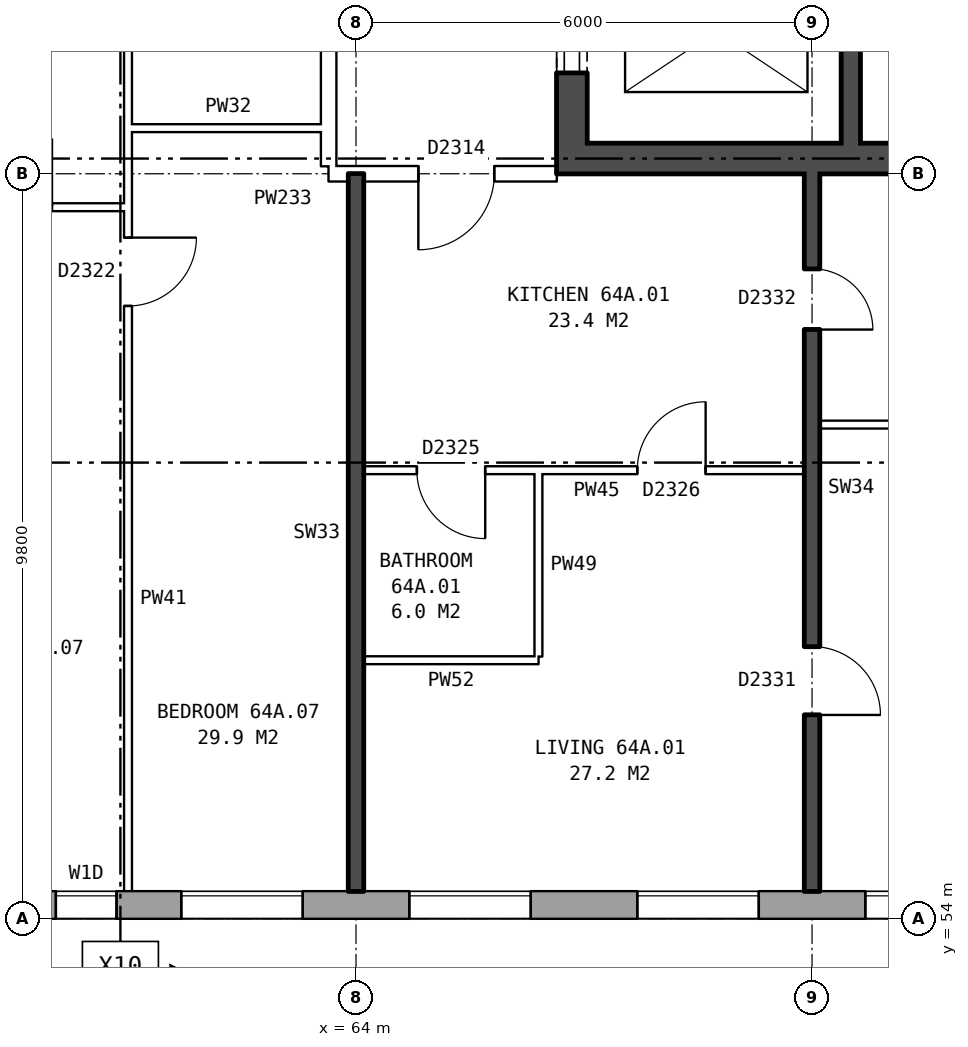
"""IFC4 building model, lengths in metres.
Left out: names, types, materials, properties, quantities, classifications, styles, units other than length and angle.
Written with IfcOpenShell. Run it as: python <this file> out.ifc"""

import sys

from ifc_helpers import new_model, si_unit, direction, frame, frame_2d, origin, place, context, subcontext, project, spatial, rectangle, extrude, element, fill, save


model = new_model("IFC4")
c1 = context("Model", 3, precision=1e-05, world=origin(), true_north=direction((0.0, 1.0)))
c2 = subcontext(c1, "Body", "Model", "MODEL_VIEW")
j1 = project(units=[si_unit("LENGTHUNIT", "METRE"), si_unit("PLANEANGLEUNIT", "RADIAN")], contexts=[c1])
p1 = place(None, origin())
s1 = spatial("IfcSite", under=j1, at=p1, CompositionType="ELEMENT")
p2 = place(p1, origin())
s2 = spatial("IfcBuilding", under=s1, at=p2, CompositionType="ELEMENT")
p3 = place(p2, frame((0.0, 0.0, 227.6)))
s3 = spatial("IfcBuildingStorey", under=s2, at=p3, CompositionType="ELEMENT", Elevation=227.6)
p4 = place(p3, frame((35.075, 54.18, 0.0), z_axis=(0.0, 0.0, 1.0), x_axis=(1.0, 0.0, 0.0)))
e1 = element("IfcWall", 1, at=p4, inside=s3, PredefinedType="STANDARD", context=c2, shape_type="SweptSolid", body=[
    extrude(rectangle(XDim=39.875, YDim=0.36, at=frame_2d((19.938, 0.0))), origin(), (0.0, 0.0, 1.0), 2.85),
])
p5 = place(p4, frame((2.625, 0.0, 0.8)))
e2 = element("IfcOpeningElement", 2, at=p5, cuts=e1, PredefinedType="OPENING", context=c2, shape_type="SweptSolid", body=[
    extrude(rectangle(XDim=1.6, YDim=1.8, at=frame_2d((0.8, 0.9))), frame((0.0, 0.19, 0.0), z_axis=(0.0, -1.0, 0.0), x_axis=(1.0, 0.0, 0.0)), (0.0, 0.0, 1.0), 0.38),
])
p6 = place(p4, frame((5.625, 0.0, 0.8)))
e3 = element("IfcOpeningElement", 3, at=p6, cuts=e1, PredefinedType="OPENING", context=c2, shape_type="SweptSolid", body=[
    extrude(rectangle(XDim=1.6, YDim=1.8, at=frame_2d((0.8, 0.9))), frame((0.0, 0.19, 0.0), z_axis=(0.0, -1.0, 0.0), x_axis=(1.0, 0.0, 0.0)), (0.0, 0.0, 1.0), 0.38),
])
p7 = place(p4, frame((8.625, 0.0, 0.8)))
e4 = element("IfcOpeningElement", 4, at=p7, cuts=e1, PredefinedType="OPENING", context=c2, shape_type="SweptSolid", body=[
    extrude(rectangle(XDim=1.6, YDim=1.8, at=frame_2d((0.8, 0.9))), frame((0.0, 0.19, 0.0), z_axis=(0.0, -1.0, 0.0), x_axis=(1.0, 0.0, 0.0)), (0.0, 0.0, 1.0), 0.38),
])
p8 = place(p4, frame((11.625, 0.0, 0.8)))
e5 = element("IfcOpeningElement", 5, at=p8, cuts=e1, PredefinedType="OPENING", context=c2, shape_type="SweptSolid", body=[
    extrude(rectangle(XDim=1.6, YDim=1.8, at=frame_2d((0.8, 0.9))), frame((0.0, 0.19, 0.0), z_axis=(0.0, -1.0, 0.0), x_axis=(1.0, 0.0, 0.0)), (0.0, 0.0, 1.0), 0.38),
])
p9 = place(p4, frame((14.625, 0.0, 0.35)))
e6 = element("IfcOpeningElement", 6, at=p9, cuts=e1, PredefinedType="OPENING", context=c2, shape_type="SweptSolid", body=[
    extrude(rectangle(XDim=0.6, YDim=0.9, at=frame_2d((0.3, 0.45))), frame((0.0, 0.19, 0.0), z_axis=(0.0, -1.0, 0.0), x_axis=(1.0, 0.0, 0.0)), (0.0, 0.0, 1.0), 0.38),
])
p10 = place(p4, frame((17.625, 0.0, 0.8)))
e7 = element("IfcOpeningElement", 7, at=p10, cuts=e1, PredefinedType="OPENING", context=c2, shape_type="SweptSolid", body=[
    extrude(rectangle(XDim=1.6, YDim=1.8, at=frame_2d((0.8, 0.9))), frame((0.0, 0.19, 0.0), z_axis=(0.0, -1.0, 0.0), x_axis=(1.0, 0.0, 0.0)), (0.0, 0.0, 1.0), 0.38),
])
p11 = place(p4, frame((20.625, 0.0, 0.8)))
e8 = element("IfcOpeningElement", 8, at=p11, cuts=e1, PredefinedType="OPENING", context=c2, shape_type="SweptSolid", body=[
    extrude(rectangle(XDim=1.6, YDim=1.8, at=frame_2d((0.8, 0.9))), frame((0.0, 0.19, 0.0), z_axis=(0.0, -1.0, 0.0), x_axis=(1.0, 0.0, 0.0)), (0.0, 0.0, 1.0), 0.38),
])
p12 = place(p4, frame((24.075, 0.0, 1.7)))
e9 = element("IfcOpeningElement", 9, at=p12, cuts=e1, PredefinedType="OPENING", context=c2, shape_type="SweptSolid", body=[
    extrude(rectangle(XDim=0.6, YDim=0.9, at=frame_2d((0.3, 0.45))), frame((0.0, 0.19, 0.0), z_axis=(0.0, -1.0, 0.0), x_axis=(1.0, 0.0, 0.0)), (0.0, 0.0, 1.0), 0.38),
])
p13 = place(p4, frame((26.625, 0.0, 0.8)))
e10 = element("IfcOpeningElement", 10, at=p13, cuts=e1, PredefinedType="OPENING", context=c2, shape_type="SweptSolid", body=[
    extrude(rectangle(XDim=1.6, YDim=1.8, at=frame_2d((0.8, 0.9))), frame((0.0, 0.19, 0.0), z_axis=(0.0, -1.0, 0.0), x_axis=(1.0, 0.0, 0.0)), (0.0, 0.0, 1.0), 0.38),
])
p14 = place(p4, frame((29.625, 0.0, 0.8)))
e11 = element("IfcOpeningElement", 11, at=p14, cuts=e1, PredefinedType="OPENING", context=c2, shape_type="SweptSolid", body=[
    extrude(rectangle(XDim=1.6, YDim=1.8, at=frame_2d((0.8, 0.9))), frame((0.0, 0.19, 0.0), z_axis=(0.0, -1.0, 0.0), x_axis=(1.0, 0.0, 0.0)), (0.0, 0.0, 1.0), 0.38),
])
p15 = place(p4, frame((32.625, 0.0, 0.8)))
e12 = element("IfcOpeningElement", 12, at=p15, cuts=e1, PredefinedType="OPENING", context=c2, shape_type="SweptSolid", body=[
    extrude(rectangle(XDim=1.6, YDim=1.8, at=frame_2d((0.8, 0.9))), frame((0.0, 0.19, 0.0), z_axis=(0.0, -1.0, 0.0), x_axis=(1.0, 0.0, 0.0)), (0.0, 0.0, 1.0), 0.38),
])
p16 = place(p4, frame((35.625, 0.0, 0.8)))
e13 = element("IfcOpeningElement", 13, at=p16, cuts=e1, PredefinedType="OPENING", context=c2, shape_type="SweptSolid", body=[
    extrude(rectangle(XDim=1.6, YDim=1.8, at=frame_2d((0.8, 0.9))), frame((0.0, 0.19, 0.0), z_axis=(0.0, -1.0, 0.0), x_axis=(1.0, 0.0, 0.0)), (0.0, 0.0, 1.0), 0.38),
])
p17 = place(p4, frame((15.525, 0.0, 0.75)))
e14 = element("IfcOpeningElement", 14, at=p17, cuts=e1, PredefinedType="OPENING", context=c2, shape_type="SweptSolid", body=[
    extrude(rectangle(XDim=1.2, YDim=1.8, at=frame_2d((0.6, 0.9))), frame((0.0, 0.19, 0.0), z_axis=(0.0, -1.0, 0.0), x_axis=(1.0, 0.0, 0.0)), (0.0, 0.0, 1.0), 0.38),
])
p18 = place(p4, frame((24.975, 0.0, 0.8)))
e15 = element("IfcOpeningElement", 15, at=p18, cuts=e1, PredefinedType="OPENING", context=c2, shape_type="SweptSolid", body=[
    extrude(rectangle(XDim=0.8, YDim=1.8, at=frame_2d((0.4, 0.9))), frame((0.0, 0.19, 0.0), z_axis=(0.0, -1.0, 0.0), x_axis=(1.0, 0.0, 0.0)), (0.0, 0.0, 1.0), 0.38),
])
p19 = place(p3, frame((66.84, 63.8, 0.0), z_axis=(0.0, 0.0, 1.0), x_axis=(0.0, 1.0, 0.0)))
e16 = element("IfcWall", 16, at=p19, inside=s3, PredefinedType="SHEAR", context=c2, shape_type="SweptSolid", body=[
    extrude(rectangle(XDim=12.4, YDim=0.4, at=frame_2d((6.2, 0.0))), origin(), (0.0, 0.0, 1.0), 2.85),
])
p20 = place(p19, frame((1.325, 0.0, 0.0)))
e17 = element("IfcOpeningElement", 17, at=p20, cuts=e16, PredefinedType="OPENING", context=c2, shape_type="SweptSolid", body=[
    extrude(rectangle(XDim=1.1, YDim=2.1, at=frame_2d((0.55, 1.05))), frame((0.0, 0.21, 0.0), z_axis=(0.0, -1.0, 0.0), x_axis=(1.0, 0.0, 0.0)), (0.0, 0.0, 1.0), 0.42),
])
p21 = place(p19, frame((3.6, 0.0, 0.0)))
e18 = element("IfcOpeningElement", 18, at=p21, cuts=e16, PredefinedType="OPENING", context=c2, shape_type="SweptSolid", body=[
    extrude(rectangle(XDim=1.1, YDim=2.1, at=frame_2d((0.55, 1.05))), frame((0.0, 0.21, 0.0), z_axis=(0.0, -1.0, 0.0), x_axis=(1.0, 0.0, 0.0)), (0.0, 0.0, 1.0), 0.42),
])
p22 = place(p19, frame((5.8, 0.0, 0.0)))
e19 = element("IfcOpeningElement", 19, at=p22, cuts=e16, PredefinedType="OPENING", context=c2, shape_type="SweptSolid", body=[
    extrude(rectangle(XDim=1.1, YDim=2.1, at=frame_2d((0.55, 1.05))), frame((0.0, 0.21, 0.0), z_axis=(0.0, -1.0, 0.0), x_axis=(1.0, 0.0, 0.0)), (0.0, 0.0, 1.0), 0.42),
])
p23 = place(p19, frame((8.0, 0.0, 0.0)))
e20 = element("IfcOpeningElement", 20, at=p23, cuts=e16, PredefinedType="OPENING", context=c2, shape_type="SweptSolid", body=[
    extrude(rectangle(XDim=1.1, YDim=2.1, at=frame_2d((0.55, 1.05))), frame((0.0, 0.21, 0.0), z_axis=(0.0, -1.0, 0.0), x_axis=(1.0, 0.0, 0.0)), (0.0, 0.0, 1.0), 0.42),
])
p24 = place(p19, frame((9.9, 0.0, 0.0)))
e21 = element("IfcOpeningElement", 21, at=p24, cuts=e16, PredefinedType="OPENING", context=c2, shape_type="SweptSolid", body=[
    extrude(rectangle(XDim=1.1, YDim=2.1, at=frame_2d((0.55, 1.05))), frame((0.0, 0.21, 0.0), z_axis=(0.0, -1.0, 0.0), x_axis=(1.0, 0.0, 0.0)), (0.0, 0.0, 1.0), 0.42),
])
p25 = place(p3, frame((67.04, 64.0, 0.0), z_axis=(0.0, 0.0, 1.0), x_axis=(1.0, 0.0, 0.0)))
e22 = element("IfcWall", 22, at=p25, inside=s3, PredefinedType="SHEAR", context=c2, shape_type="SweptSolid", body=[
    extrude(rectangle(XDim=8.2, YDim=0.4, at=frame_2d((4.1, 0.0))), origin(), (0.0, 0.0, 1.0), 2.85),
])
p26 = place(p3, frame((70.51, 64.2, 0.0), z_axis=(0.0, 0.0, 1.0), x_axis=(0.0, 1.0, 0.0)))
e23 = element("IfcWall", 23, at=p26, inside=s3, PredefinedType="SHEAR", context=c2, shape_type="SweptSolid", body=[
    extrude(rectangle(XDim=2.525, YDim=0.25, at=frame_2d((1.263, 0.0))), origin(), (0.0, 0.0, 1.0), 2.85),
])
p27 = place(p3, frame((63.64, 63.9, 0.0), z_axis=(0.0, 0.0, 1.0), x_axis=(0.0, 1.0, 0.0)))
e24 = element("IfcWall", 24, at=p27, inside=s3, PredefinedType="PARTITIONING", context=c2, shape_type="SweptSolid", body=[
    extrude(rectangle(XDim=12.2, YDim=0.2, at=frame_2d((6.1, 0.0))), origin(), (0.0, 0.0, 1.0), 2.85),
])
p28 = place(p27, frame((5.1, 0.0, 0.0)))
e25 = element("IfcOpeningElement", 25, at=p28, cuts=e24, PredefinedType="OPENING", context=c2, shape_type="SweptSolid", body=[
    extrude(rectangle(XDim=2.0, YDim=2.1, at=frame_2d((1.0, 1.05))), frame((0.0, 0.11, 0.0), z_axis=(0.0, -1.0, 0.0), x_axis=(1.0, 0.0, 0.0)), (0.0, 0.0, 1.0), 0.22),
])
p29 = place(p3, frame((64.1, 57.4, 0.0), z_axis=(0.0, 0.0, 1.0), x_axis=(1.0, 0.0, 0.0)))
e26 = element("IfcWall", 26, at=p29, inside=s3, PredefinedType="PARTITIONING", context=c2, shape_type="SweptSolid", body=[
    extrude(rectangle(XDim=2.3, YDim=0.1, at=frame_2d((1.15, 0.0))), origin(), (0.0, 0.0, 1.0), 2.85),
])
p30 = place(p3, frame((64.1, 59.9, 0.0), z_axis=(0.0, 0.0, 1.0), x_axis=(1.0, 0.0, 0.0)))
e27 = element("IfcWall", 27, at=p30, inside=s3, PredefinedType="PARTITIONING", context=c2, shape_type="SweptSolid", body=[
    extrude(rectangle(XDim=5.8, YDim=0.1, at=frame_2d((2.9, 0.0))), origin(), (0.0, 0.0, 1.0), 2.85),
])
p31 = place(p30, frame((3.6, 0.0, 0.0)))
e28 = element("IfcOpeningElement", 28, at=p31, cuts=e27, PredefinedType="OPENING", context=c2, shape_type="SweptSolid", body=[
    extrude(rectangle(XDim=0.9, YDim=2.1, at=frame_2d((0.45, 1.05))), frame((0.0, 0.06, 0.0), z_axis=(0.0, -1.0, 0.0), x_axis=(1.0, 0.0, 0.0)), (0.0, 0.0, 1.0), 0.12),
])
p32 = place(p30, frame((0.7, 0.0, 0.0)))
e29 = element("IfcOpeningElement", 29, at=p32, cuts=e27, PredefinedType="OPENING", context=c2, shape_type="SweptSolid", body=[
    extrude(rectangle(XDim=0.9, YDim=2.1, at=frame_2d((0.45, 1.05))), frame((0.0, 0.06, 0.0), z_axis=(0.0, -1.0, 0.0), x_axis=(1.0, 0.0, 0.0)), (0.0, 0.0, 1.0), 0.12),
])
p33 = place(p3, frame((70.1, 60.5, 0.0), z_axis=(0.0, 0.0, 1.0), x_axis=(1.0, 0.0, 0.0)))
e30 = element("IfcWall", 30, at=p33, inside=s3, PredefinedType="PARTITIONING", context=c2, shape_type="SweptSolid", body=[
    extrude(rectangle(XDim=5.8, YDim=0.1, at=frame_2d((2.9, 0.0))), origin(), (0.0, 0.0, 1.0), 2.85),
])
p34 = place(p3, frame((58.1, 63.36, 0.0), z_axis=(0.0, 0.0, 1.0), x_axis=(1.0, 0.0, 0.0)))
e31 = element("IfcWall", 31, at=p34, inside=s3, PredefinedType="PARTITIONING", context=c2, shape_type="SweptSolid", body=[
    extrude(rectangle(XDim=2.9, YDim=0.1, at=frame_2d((1.45, 0.0))), origin(), (0.0, 0.0, 1.0), 2.85),
])
p35 = place(p34, frame((1.0, 0.0, 0.0)))
e32 = element("IfcOpeningElement", 32, at=p35, cuts=e31, PredefinedType="OPENING", context=c2, shape_type="SweptSolid", body=[
    extrude(rectangle(XDim=0.9, YDim=2.1, at=frame_2d((0.45, 1.05))), frame((0.0, 0.06, 0.0), z_axis=(0.0, -1.0, 0.0), x_axis=(1.0, 0.0, 0.0)), (0.0, 0.0, 1.0), 0.12),
])
p36 = place(p3, frame((63.64, 63.8, 0.0), z_axis=(0.0, 0.0, 1.0), x_axis=(1.0, 0.0, 0.0)))
e33 = element("IfcWall", 33, at=p36, inside=s3, PredefinedType="PARTITIONING", context=c2, shape_type="SweptSolid", body=[
    extrude(rectangle(XDim=3.0, YDim=0.2, at=frame_2d((1.5, 0.0))), origin(), (0.0, 0.0, 1.0), 2.85),
])
p37 = place(p36, frame((1.18, 0.0, 0.0)))
e34 = element("IfcOpeningElement", 34, at=p37, cuts=e33, PredefinedType="OPENING", context=c2, shape_type="SweptSolid", body=[
    extrude(rectangle(XDim=1.0, YDim=2.1, at=frame_2d((0.5, 1.05))), frame((0.0, 0.11, 0.0), z_axis=(0.0, -1.0, 0.0), x_axis=(1.0, 0.0, 0.0)), (0.0, 0.0, 1.0), 0.22),
])
p38 = place(p3, frame((61.0, 64.4, 0.0), z_axis=(0.0, 0.0, 1.0), x_axis=(1.0, 0.0, 0.0)))
e35 = element("IfcWall", 35, at=p38, inside=s3, PredefinedType="PARTITIONING", context=c2, shape_type="SweptSolid", body=[
    extrude(rectangle(XDim=2.64, YDim=0.1, at=frame_2d((1.32, 0.0))), origin(), (0.0, 0.0, 1.0), 2.85),
])
p39 = place(p3, frame((61.0, 54.36, 0.0), z_axis=(0.0, 0.0, 1.0), x_axis=(0.0, 1.0, 0.0)))
e36 = element("IfcWall", 36, at=p39, inside=s3, PredefinedType="PARTITIONING", context=c2, shape_type="SweptSolid", body=[
    extrude(rectangle(XDim=14.34, YDim=0.1, at=frame_2d((7.17, 0.0))), origin(), (0.0, 0.0, 1.0), 2.85),
])
p40 = place(p39, frame((7.7, 0.0, 0.0)))
e37 = element("IfcOpeningElement", 37, at=p40, cuts=e36, PredefinedType="OPENING", context=c2, shape_type="SweptSolid", body=[
    extrude(rectangle(XDim=0.9, YDim=2.1, at=frame_2d((0.45, 1.05))), frame((0.0, 0.06, 0.0), z_axis=(0.0, -1.0, 0.0), x_axis=(1.0, 0.0, 0.0)), (0.0, 0.0, 1.0), 0.12),
])
p41 = place(p39, frame((13.04, 0.0, 0.0)))
e38 = element("IfcOpeningElement", 38, at=p41, cuts=e36, PredefinedType="OPENING", context=c2, shape_type="SweptSolid", body=[
    extrude(rectangle(XDim=0.9, YDim=2.1, at=frame_2d((0.45, 1.05))), frame((0.0, 0.06, 0.0), z_axis=(0.0, -1.0, 0.0), x_axis=(1.0, 0.0, 0.0)), (0.0, 0.0, 1.0), 0.12),
])
p42 = place(p3, frame((64.0, 54.36, 0.0), z_axis=(0.0, 0.0, 1.0), x_axis=(0.0, 1.0, 0.0)))
e39 = element("IfcWall", 39, at=p42, inside=s3, PredefinedType="SOLIDWALL", context=c2, shape_type="SweptSolid", body=[
    extrude(rectangle(XDim=9.44, YDim=0.2, at=frame_2d((4.72, 0.0))), origin(), (0.0, 0.0, 1.0), 2.85),
])
p43 = place(p3, frame((66.4, 57.45, 0.0), z_axis=(0.0, 0.0, 1.0), x_axis=(0.0, 1.0, 0.0)))
e40 = element("IfcWall", 40, at=p43, inside=s3, PredefinedType="PARTITIONING", context=c2, shape_type="SweptSolid", body=[
    extrude(rectangle(XDim=2.4, YDim=0.1, at=frame_2d((1.2, 0.0))), origin(), (0.0, 0.0, 1.0), 2.85),
])
p44 = place(p3, frame((70.0, 54.36, 0.0), z_axis=(0.0, 0.0, 1.0), x_axis=(0.0, 1.0, 0.0)))
e41 = element("IfcWall", 41, at=p44, inside=s3, PredefinedType="SOLIDWALL", context=c2, shape_type="SweptSolid", body=[
    extrude(rectangle(XDim=9.44, YDim=0.2, at=frame_2d((4.72, 0.0))), origin(), (0.0, 0.0, 1.0), 2.85),
])
p45 = place(p44, frame((2.32, 0.0, 0.0)))
e42 = element("IfcOpeningElement", 42, at=p45, cuts=e41, PredefinedType="OPENING", context=c2, shape_type="SweptSolid", body=[
    extrude(rectangle(XDim=0.9, YDim=2.1, at=frame_2d((0.45, 1.05))), frame((0.0, 0.11, 0.0), z_axis=(0.0, -1.0, 0.0), x_axis=(1.0, 0.0, 0.0)), (0.0, 0.0, 1.0), 0.22),
])
p46 = place(p44, frame((7.39, 0.0, 0.0)))
e43 = element("IfcOpeningElement", 43, at=p46, cuts=e41, PredefinedType="OPENING", context=c2, shape_type="SweptSolid", body=[
    extrude(rectangle(XDim=0.8, YDim=2.1, at=frame_2d((0.4, 1.05))), frame((0.0, 0.11, 0.0), z_axis=(0.0, -1.0, 0.0), x_axis=(1.0, 0.0, 0.0)), (0.0, 0.0, 1.0), 0.22),
])
p47 = place(p13, origin())
e44 = element("IfcWindow", 44, at=p47, inside=s3, PartitioningType="SINGLE_PANEL", PredefinedType="WINDOW", context=c2, shape_type="SweptSolid", body=[
    extrude(rectangle(XDim=1.6, YDim=1.8, at=frame_2d((0.8, 0.9))), frame((0.0, 0.15, 0.0), z_axis=(0.0, -1.0, 0.0), x_axis=(1.0, 0.0, 0.0)), (0.0, 0.0, 1.0), 0.06),
])
fill(e10, e44)
p48 = place(p14, origin())
e45 = element("IfcWindow", 45, at=p48, inside=s3, PartitioningType="SINGLE_PANEL", PredefinedType="WINDOW", context=c2, shape_type="SweptSolid", body=[
    extrude(rectangle(XDim=1.6, YDim=1.8, at=frame_2d((0.8, 0.9))), frame((0.0, 0.15, 0.0), z_axis=(0.0, -1.0, 0.0), x_axis=(1.0, 0.0, 0.0)), (0.0, 0.0, 1.0), 0.06),
])
fill(e11, e45)
p49 = place(p15, origin())
e46 = element("IfcWindow", 46, at=p49, inside=s3, PartitioningType="SINGLE_PANEL", PredefinedType="WINDOW", context=c2, shape_type="SweptSolid", body=[
    extrude(rectangle(XDim=1.6, YDim=1.8, at=frame_2d((0.8, 0.9))), frame((0.0, 0.15, 0.0), z_axis=(0.0, -1.0, 0.0), x_axis=(1.0, 0.0, 0.0)), (0.0, 0.0, 1.0), 0.06),
])
fill(e12, e46)
p50 = place(p16, origin())
e47 = element("IfcWindow", 47, at=p50, inside=s3, PartitioningType="SINGLE_PANEL", PredefinedType="WINDOW", context=c2, shape_type="SweptSolid", body=[
    extrude(rectangle(XDim=1.6, YDim=1.8, at=frame_2d((0.8, 0.9))), frame((0.0, 0.15, 0.0), z_axis=(0.0, -1.0, 0.0), x_axis=(1.0, 0.0, 0.0)), (0.0, 0.0, 1.0), 0.06),
])
fill(e13, e47)
p51 = place(p20, origin())
e48 = element("IfcDoor", 48, at=p51, inside=s3, OperationType="DOUBLE_DOOR_SLIDING", PredefinedType="DOOR", context=c2, shape_type="SweptSolid", body=[
    extrude(rectangle(XDim=1.1, YDim=2.1, at=frame_2d((0.55, 1.05))), frame((0.0, -0.135, 0.0), z_axis=(0.0, -1.0, 0.0), x_axis=(1.0, 0.0, 0.0)), (0.0, 0.0, 1.0), 0.05),
])
fill(e17, e48)
p52 = place(p45, frame((0.9, 0.0, 0.0), z_axis=(0.0, 0.0, 1.0), x_axis=(-1.0, 0.0, 0.0)))
e49 = element("IfcDoor", 49, at=p52, inside=s3, OperationType="SINGLE_SWING_RIGHT", PredefinedType="DOOR", context=c2, shape_type="SweptSolid", body=[
    extrude(rectangle(XDim=0.9, YDim=2.1, at=frame_2d((0.45, 1.05))), frame((0.0, 0.025, 0.0), z_axis=(0.0, -1.0, 0.0), x_axis=(1.0, 0.0, 0.0)), (0.0, 0.0, 1.0), 0.05),
])
fill(e42, e49)
p53 = place(p37, frame((1.0, 0.0, 0.0), z_axis=(0.0, 0.0, 1.0), x_axis=(-1.0, 0.0, 0.0)))
e50 = element("IfcDoor", 50, at=p53, inside=s3, OperationType="SINGLE_SWING_RIGHT", PredefinedType="DOOR", context=c2, shape_type="SweptSolid", body=[
    extrude(rectangle(XDim=1.0, YDim=2.1, at=frame_2d((0.5, 1.05))), frame((0.0, 0.025, 0.0), z_axis=(0.0, -1.0, 0.0), x_axis=(1.0, 0.0, 0.0)), (0.0, 0.0, 1.0), 0.05),
])
fill(e34, e50)
p54 = place(p31, origin())
e51 = element("IfcDoor", 51, at=p54, inside=s3, OperationType="SINGLE_SWING_RIGHT", PredefinedType="DOOR", context=c2, shape_type="SweptSolid", body=[
    extrude(rectangle(XDim=0.9, YDim=2.1, at=frame_2d((0.45, 1.05))), frame((0.0, 0.025, 0.0), z_axis=(0.0, -1.0, 0.0), x_axis=(1.0, 0.0, 0.0)), (0.0, 0.0, 1.0), 0.05),
])
fill(e28, e51)
p55 = place(p46, frame((0.8, 0.0, 0.0), z_axis=(0.0, 0.0, 1.0), x_axis=(-1.0, 0.0, 0.0)))
e52 = element("IfcDoor", 52, at=p55, inside=s3, OperationType="SINGLE_SWING_RIGHT", PredefinedType="DOOR", context=c2, shape_type="SweptSolid", body=[
    extrude(rectangle(XDim=0.8, YDim=2.1, at=frame_2d((0.4, 1.05))), frame((0.0, 0.025, 0.0), z_axis=(0.0, -1.0, 0.0), x_axis=(1.0, 0.0, 0.0)), (0.0, 0.0, 1.0), 0.05),
])
fill(e43, e52)
p56 = place(p32, frame((0.9, 0.0, 0.0), z_axis=(0.0, 0.0, 1.0), x_axis=(-1.0, 0.0, 0.0)))
e53 = element("IfcDoor", 53, at=p56, inside=s3, OperationType="SINGLE_SWING_LEFT", PredefinedType="DOOR", context=c2, shape_type="SweptSolid", body=[
    extrude(rectangle(XDim=0.9, YDim=2.1, at=frame_2d((0.45, 1.05))), frame((0.0, 0.025, 0.0), z_axis=(0.0, -1.0, 0.0), x_axis=(1.0, 0.0, 0.0)), (0.0, 0.0, 1.0), 0.05),
])
fill(e29, e53)
p57 = place(p40, frame((0.9, 0.0, 0.0), z_axis=(0.0, 0.0, 1.0), x_axis=(-1.0, 0.0, 0.0)))
e54 = element("IfcDoor", 54, at=p57, inside=s3, OperationType="SINGLE_SWING_LEFT", PredefinedType="DOOR", context=c2, shape_type="SweptSolid", body=[
    extrude(rectangle(XDim=0.9, YDim=2.1, at=frame_2d((0.45, 1.05))), frame((0.0, 0.025, 0.0), z_axis=(0.0, -1.0, 0.0), x_axis=(1.0, 0.0, 0.0)), (0.0, 0.0, 1.0), 0.05),
])
fill(e37, e54)
p58 = place(p18, origin())
e55 = element("IfcWindow", 55, at=p58, inside=s3, PartitioningType="SINGLE_PANEL", PredefinedType="WINDOW", context=c2, shape_type="SweptSolid", body=[
    extrude(rectangle(XDim=0.8, YDim=1.8, at=frame_2d((0.4, 0.9))), frame((0.0, 0.15, 0.0), z_axis=(0.0, -1.0, 0.0), x_axis=(1.0, 0.0, 0.0)), (0.0, 0.0, 1.0), 0.06),
])
fill(e15, e55)
save(model, sys.argv[1])
